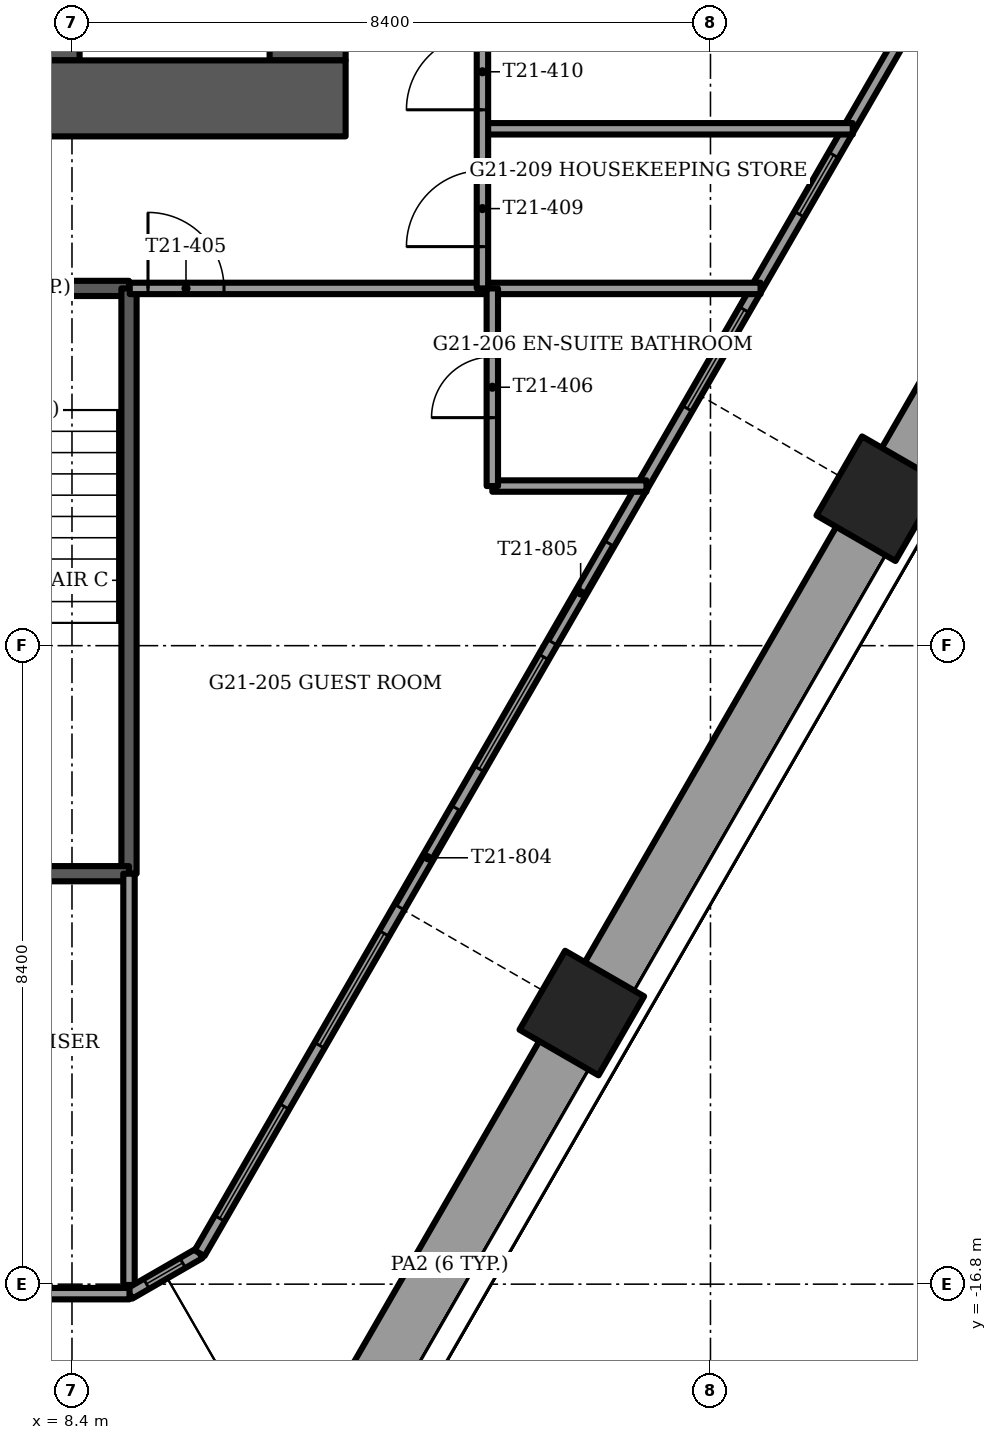
"""IFC4 building model, lengths in metres.
Left out: names, types, materials, properties, quantities, classifications, styles, units other than length and angle.
Written with IfcOpenShell. Run it as: python <this file> out.ifc"""

import sys

from ifc_helpers import new_model, si_unit, direction, frame, frame_2d, origin, origin_2d, place, context, subcontext, project, spatial, rectangle, extrude, element, fill, save


model = new_model("IFC4")
c1 = context("Model", 3, precision=1e-05, world=origin(), true_north=direction((0.0, 1.0)))
c2 = subcontext(c1, "Body", "Model", "MODEL_VIEW")
j1 = project(units=[si_unit("LENGTHUNIT", "METRE"), si_unit("PLANEANGLEUNIT", "RADIAN")], contexts=[c1])
p1 = place(None, origin())
s1 = spatial("IfcSite", under=j1, at=p1, CompositionType="ELEMENT")
p2 = place(p1, origin())
s2 = spatial("IfcBuilding", under=s1, at=p2, CompositionType="ELEMENT")
p3 = place(p2, frame((0.0, 0.0, 85.5)))
s3 = spatial("IfcBuildingStorey", under=s2, at=p3, CompositionType="ELEMENT", Elevation=85.5)
for number, where, z_axis, x_axis in (
    (1, (15.107, -13.233, -1.2), (0.0, 0.0, 1.0), (-0.5, -0.866, 0.0)),
    (2, (19.014, -6.467, -1.2), (0.0, 0.0, 1.0), (-0.5, -0.866, 0.0)),
):
    element("IfcColumn", number, at=place(p3, frame(where, z_axis=z_axis, x_axis=x_axis)), inside=s3, PredefinedType="COLUMN", context=c2, shape_type="SweptSolid", body=[
        extrude(rectangle(XDim=1.2, YDim=1.2, at=origin_2d()), origin(), (0.0, 0.0, 1.0), 3.75),
    ])
p4 = place(p3, frame((-12.0, -1.2, -0.3), z_axis=(0.0, 0.0, 1.0), x_axis=(1.0, 0.0, 0.0)))
e3 = element("IfcWall", 3, at=p4, inside=s3, PredefinedType="SHEAR", context=c2, shape_type="SweptSolid", body=[
    extrude(rectangle(XDim=24.0, YDim=1.0, at=frame_2d((12.0, 0.0))), origin(), (0.0, 0.0, 1.0), 3.75),
])
p5 = place(p4, frame((11.2, 0.0, 0.0)))
e4 = element("IfcOpeningElement", 4, at=p5, cuts=e3, PredefinedType="OPENING", context=c2, shape_type="SweptSolid", body=[
    extrude(rectangle(XDim=1.6, YDim=2.1, at=frame_2d((0.8, 1.05))), frame((0.0, 0.5, 0.0), z_axis=(0.0, -1.0, 0.0), x_axis=(1.0, 0.0, 0.0)), (0.0, 0.0, 1.0), 1.0),
])
p6 = place(p3, frame((8.1, -0.7, -0.3), z_axis=(0.0, 0.0, 1.0), x_axis=(0.0, 1.0, 0.0)))
e5 = element("IfcWall", 5, at=p6, inside=s3, PredefinedType="SHEAR", context=c2, shape_type="SweptSolid", body=[
    extrude(rectangle(XDim=9.4, YDim=0.8, at=frame_2d((4.7, 0.0))), origin(), (0.0, 0.0, 1.0), 3.75),
])
p7 = place(p6, frame((7.95, 0.0, 0.0)))
e6 = element("IfcOpeningElement", 6, at=p7, cuts=e5, PredefinedType="OPENING", context=c2, shape_type="SweptSolid", body=[
    extrude(rectangle(XDim=1.1, YDim=2.1, at=frame_2d((0.55, 1.05))), frame((0.0, 0.4, 0.0), z_axis=(0.0, -1.0, 0.0), x_axis=(1.0, 0.0, 0.0)), (0.0, 0.0, 1.0), 0.8),
])
p8 = place(p3, frame((11.5, -0.7, -0.3), z_axis=(0.0, 0.0, 1.0), x_axis=(0.0, 1.0, 0.0)))
e7 = element("IfcWall", 7, at=p8, inside=s3, PredefinedType="SHEAR", context=c2, shape_type="SweptSolid", body=[
    extrude(rectangle(XDim=9.4, YDim=1.0, at=frame_2d((4.7, 0.0))), origin(), (0.0, 0.0, 1.0), 3.75),
])
p9 = place(p8, frame((8.15, 0.0, 0.0)))
e8 = element("IfcOpeningElement", 8, at=p9, cuts=e7, PredefinedType="OPENING", context=c2, shape_type="SweptSolid", body=[
    extrude(rectangle(XDim=1.1, YDim=2.1, at=frame_2d((0.55, 1.05))), frame((0.0, 0.5, 0.0), z_axis=(0.0, -1.0, 0.0), x_axis=(1.0, 0.0, 0.0)), (0.0, 0.0, 1.0), 1.0),
])
p10 = place(p8, frame((0.55, 0.0, 0.0)))
e9 = element("IfcOpeningElement", 9, at=p10, cuts=e7, PredefinedType="OPENING", context=c2, shape_type="SweptSolid", body=[
    extrude(rectangle(XDim=1.2, YDim=2.1, at=frame_2d((0.6, 1.05))), frame((0.0, 0.5, 0.0), z_axis=(0.0, -1.0, 0.0), x_axis=(1.0, 0.0, 0.0)), (0.0, 0.0, 1.0), 1.0),
])
p11 = place(p8, frame((3.0, 0.0, 0.0)))
e10 = element("IfcOpeningElement", 10, at=p11, cuts=e7, PredefinedType="OPENING", context=c2, shape_type="SweptSolid", body=[
    extrude(rectangle(XDim=1.2, YDim=2.1, at=frame_2d((0.6, 1.05))), frame((0.0, 0.5, 0.0), z_axis=(0.0, -1.0, 0.0), x_axis=(1.0, 0.0, 0.0)), (0.0, 0.0, 1.0), 1.0),
])
p12 = place(p3, frame((11.786, -19.286, 0.0), z_axis=(0.0, 0.0, 1.0), x_axis=(0.499982754166, 0.866035360443, 0.0)))
e11 = element("IfcWall", 11, at=p12, inside=s3, PredefinedType="PARAPET", context=c2, shape_type="SweptSolid", body=[
    extrude(rectangle(XDim=6.333, YDim=0.9, at=frame_2d((3.167, 0.0))), origin(), (0.0, 0.0, 1.0), 1.1),
])
p13 = place(p3, frame((15.522, -12.815, 0.0), z_axis=(0.0, 0.0, 1.0), x_axis=(0.499999023957, 0.866025967302, 0.0)))
e12 = element("IfcWall", 12, at=p13, inside=s3, PredefinedType="PARAPET", context=c2, shape_type="SweptSolid", body=[
    extrude(rectangle(XDim=6.673, YDim=0.9, at=frame_2d((3.337, 0.0))), origin(), (0.0, 0.0, 1.0), 1.1),
])
p14 = place(p3, frame((19.429, -6.048, 0.0), z_axis=(0.0, 0.0, 1.0), x_axis=(0.500011668103, 0.866018667098, 0.0)))
e13 = element("IfcWall", 13, at=p14, inside=s3, PredefinedType="PARAPET", context=c2, shape_type="SweptSolid", body=[
    extrude(rectangle(XDim=6.333, YDim=0.9, at=frame_2d((3.167, 0.0))), origin(), (0.0, 0.0, 1.0), 1.1),
])
p15 = place(p3, frame((-9.157, -16.925, 0.0), z_axis=(0.0, 0.0, 1.0), x_axis=(1.0, 0.0, 0.0)))
e14 = element("IfcWall", 14, at=p15, inside=s3, PredefinedType="SOLIDWALL", context=c2, shape_type="SweptSolid", body=[
    extrude(rectangle(XDim=18.313, YDim=0.15, at=frame_2d((9.157, 0.0))), origin(), (0.0, 0.0, 1.0), 3.45),
])
p16 = place(p15, frame((3.707, 0.0, 0.15)))
e15 = element("IfcOpeningElement", 15, at=p16, cuts=e14, PredefinedType="OPENING", context=c2, shape_type="SweptSolid", body=[
    extrude(rectangle(XDim=0.9, YDim=2.85, at=frame_2d((0.45, 1.425))), frame((0.0, 0.075, 0.0), z_axis=(0.0, -1.0, 0.0), x_axis=(1.0, 0.0, 0.0)), (0.0, 0.0, 1.0), 0.15),
])
p17 = place(p15, frame((1.507, 0.0, 0.15)))
e16 = element("IfcOpeningElement", 16, at=p17, cuts=e14, PredefinedType="OPENING", context=c2, shape_type="SweptSolid", body=[
    extrude(rectangle(XDim=1.5, YDim=2.85, at=frame_2d((0.75, 1.425))), frame((0.0, 0.075, 0.0), z_axis=(0.0, -1.0, 0.0), x_axis=(1.0, 0.0, 0.0)), (0.0, 0.0, 1.0), 0.15),
])
p18 = place(p15, frame((5.257, 0.0, 0.15)))
e17 = element("IfcOpeningElement", 17, at=p18, cuts=e14, PredefinedType="OPENING", context=c2, shape_type="SweptSolid", body=[
    extrude(rectangle(XDim=1.7, YDim=2.85, at=frame_2d((0.85, 1.425))), frame((0.0, 0.075, 0.0), z_axis=(0.0, -1.0, 0.0), x_axis=(1.0, 0.0, 0.0)), (0.0, 0.0, 1.0), 0.15),
])
p19 = place(p15, frame((7.307, 0.0, 0.15)))
e18 = element("IfcOpeningElement", 18, at=p19, cuts=e14, PredefinedType="OPENING", context=c2, shape_type="SweptSolid", body=[
    extrude(rectangle(XDim=1.5, YDim=2.85, at=frame_2d((0.75, 1.425))), frame((0.0, 0.075, 0.0), z_axis=(0.0, -1.0, 0.0), x_axis=(1.0, 0.0, 0.0)), (0.0, 0.0, 1.0), 0.15),
])
p20 = place(p15, frame((9.507, 0.0, 0.15)))
e19 = element("IfcOpeningElement", 19, at=p20, cuts=e14, PredefinedType="OPENING", context=c2, shape_type="SweptSolid", body=[
    extrude(rectangle(XDim=1.7, YDim=2.85, at=frame_2d((0.85, 1.425))), frame((0.0, 0.075, 0.0), z_axis=(0.0, -1.0, 0.0), x_axis=(1.0, 0.0, 0.0)), (0.0, 0.0, 1.0), 0.15),
])
p21 = place(p15, frame((11.557, 0.0, 0.0)))
e20 = element("IfcOpeningElement", 20, at=p21, cuts=e14, PredefinedType="OPENING", context=c2, shape_type="SweptSolid", body=[
    extrude(rectangle(XDim=1.5, YDim=2.4, at=frame_2d((0.75, 1.2))), frame((0.0, 0.075, 0.0), z_axis=(0.0, -1.0, 0.0), x_axis=(1.0, 0.0, 0.0)), (0.0, 0.0, 1.0), 0.15),
])
p22 = place(p15, frame((15.307, 0.0, 0.15)))
e21 = element("IfcOpeningElement", 21, at=p22, cuts=e14, PredefinedType="OPENING", context=c2, shape_type="SweptSolid", body=[
    extrude(rectangle(XDim=1.7, YDim=2.85, at=frame_2d((0.85, 1.425))), frame((0.0, 0.075, 0.0), z_axis=(0.0, -1.0, 0.0), x_axis=(1.0, 0.0, 0.0)), (0.0, 0.0, 1.0), 0.15),
])
p23 = place(p3, frame((10.079, -16.393, 0.0), z_axis=(0.0, 0.0, 1.0), x_axis=(0.499995945303, 0.866027744752, 0.0)))
e22 = element("IfcWall", 22, at=p23, inside=s3, PredefinedType="SOLIDWALL", context=c2, shape_type="SweptSolid", body=[
    extrude(rectangle(XDim=18.314, YDim=0.15, at=frame_2d((9.157, 0.0))), origin(), (0.0, 0.0, 1.0), 3.45),
])
p24 = place(p23, frame((3.157, 0.0, 0.15)))
e23 = element("IfcOpeningElement", 23, at=p24, cuts=e22, PredefinedType="OPENING", context=c2, shape_type="SweptSolid", body=[
    extrude(rectangle(XDim=1.7, YDim=2.85, at=frame_2d((0.85, 1.425))), frame((0.0, 0.075, 0.0), z_axis=(0.0, -1.0, 0.0), x_axis=(1.0, 0.0, 0.0)), (0.0, 0.0, 1.0), 0.15),
])
p25 = place(p23, frame((5.257, 0.0, 0.0)))
e24 = element("IfcOpeningElement", 24, at=p25, cuts=e22, PredefinedType="OPENING", context=c2, shape_type="SweptSolid", body=[
    extrude(rectangle(XDim=1.5, YDim=2.4, at=frame_2d((0.75, 1.2))), frame((0.0, 0.075, 0.0), z_axis=(0.0, -1.0, 0.0), x_axis=(1.0, 0.0, 0.0)), (0.0, 0.0, 1.0), 0.15),
])
p26 = place(p23, frame((7.357, 0.0, 0.15)))
e25 = element("IfcOpeningElement", 25, at=p26, cuts=e22, PredefinedType="OPENING", context=c2, shape_type="SweptSolid", body=[
    extrude(rectangle(XDim=1.7, YDim=2.85, at=frame_2d((0.85, 1.425))), frame((0.0, 0.075, 0.0), z_axis=(0.0, -1.0, 0.0), x_axis=(1.0, 0.0, 0.0)), (0.0, 0.0, 1.0), 0.15),
])
p27 = place(p23, frame((9.28, 0.0, 0.0)))
e26 = element("IfcOpeningElement", 26, at=p27, cuts=e22, PredefinedType="OPENING", context=c2, shape_type="SweptSolid", body=[
    extrude(rectangle(XDim=1.5, YDim=2.4, at=frame_2d((0.75, 1.2))), frame((0.0, 0.075, 0.0), z_axis=(0.0, -1.0, 0.0), x_axis=(1.0, 0.0, 0.0)), (0.0, 0.0, 1.0), 0.15),
])
p28 = place(p23, frame((12.832, 0.0, 0.15)))
e27 = element("IfcOpeningElement", 27, at=p28, cuts=e22, PredefinedType="OPENING", context=c2, shape_type="SweptSolid", body=[
    extrude(rectangle(XDim=1.5, YDim=2.85, at=frame_2d((0.75, 1.425))), frame((0.0, 0.075, 0.0), z_axis=(0.0, -1.0, 0.0), x_axis=(1.0, 0.0, 0.0)), (0.0, 0.0, 1.0), 0.15),
])
p29 = place(p23, frame((0.528, 0.0, 0.15)))
e28 = element("IfcOpeningElement", 28, at=p29, cuts=e22, PredefinedType="OPENING", context=c2, shape_type="SweptSolid", body=[
    extrude(rectangle(XDim=1.7, YDim=2.73, at=frame_2d((0.85, 1.365))), frame((0.0, 0.075, 0.0), z_axis=(0.0, -1.0, 0.0), x_axis=(1.0, 0.0, 0.0)), (0.0, 0.0, 1.0), 0.15),
])
p30 = place(p23, frame((15.782, 0.0, 0.15)))
e29 = element("IfcOpeningElement", 29, at=p30, cuts=e22, PredefinedType="OPENING", context=c2, shape_type="SweptSolid", body=[
    extrude(rectangle(XDim=0.9, YDim=2.73, at=frame_2d((0.45, 1.365))), frame((0.0, 0.075, 0.0), z_axis=(0.0, -1.0, 0.0), x_axis=(1.0, 0.0, 0.0)), (0.0, 0.0, 1.0), 0.15),
])
p31 = place(p3, frame((9.157, -16.925, 0.0), z_axis=(0.0, 0.0, 1.0), x_axis=(0.866048165231, 0.499960573946, 0.0)))
e30 = element("IfcWall", 30, at=p31, inside=s3, PredefinedType="SOLIDWALL", context=c2, shape_type="SweptSolid", body=[
    extrude(rectangle(XDim=1.065, YDim=0.15, at=frame_2d((0.532, 0.0))), origin(), (0.0, 0.0, 1.0), 3.45),
])
p32 = place(p31, frame((0.258, 0.0, 0.15)))
e31 = element("IfcOpeningElement", 31, at=p32, cuts=e30, PredefinedType="OPENING", context=c2, shape_type="SweptSolid", body=[
    extrude(rectangle(XDim=0.55, YDim=2.85, at=frame_2d((0.275, 1.425))), frame((0.0, 0.075, 0.0), z_axis=(0.0, -1.0, 0.0), x_axis=(1.0, 0.0, 0.0)), (0.0, 0.0, 1.0), 0.15),
])
p33 = place(p3, frame((5.8, -3.7, -0.3), z_axis=(0.0, 0.0, 1.0), x_axis=(1.0, 0.0, 0.0)))
e32 = element("IfcWall", 32, at=p33, inside=s3, PredefinedType="SOLIDWALL", context=c2, shape_type="SweptSolid", body=[
    extrude(rectangle(XDim=3.35, YDim=0.2, at=frame_2d((1.675, 0.0))), origin(), (0.0, 0.0, 1.0), 3.75),
])
p34 = place(p33, frame((1.125, 0.0, 0.0)))
e33 = element("IfcOpeningElement", 33, at=p34, cuts=e32, PredefinedType="OPENING", context=c2, shape_type="SweptSolid", body=[
    extrude(rectangle(XDim=1.1, YDim=2.1, at=frame_2d((0.55, 1.05))), frame((0.0, 0.1, 0.0), z_axis=(0.0, -1.0, 0.0), x_axis=(1.0, 0.0, 0.0)), (0.0, 0.0, 1.0), 0.2),
])
p35 = place(p3, frame((9.15, -3.7, -0.3), z_axis=(0.0, 0.0, 1.0), x_axis=(0.0, -1.0, 0.0)))
e34 = element("IfcWall", 34, at=p35, inside=s3, PredefinedType="SOLIDWALL", context=c2, shape_type="SweptSolid", body=[
    extrude(rectangle(XDim=7.7, YDim=0.2, at=frame_2d((3.85, 0.0))), origin(), (0.0, 0.0, 1.0), 3.75),
])
p36 = place(p3, frame((5.8, -11.4, -0.3), z_axis=(0.0, 0.0, 1.0), x_axis=(1.0, 0.0, 0.0)))
e35 = element("IfcWall", 35, at=p36, inside=s3, PredefinedType="SOLIDWALL", context=c2, shape_type="SweptSolid", body=[
    extrude(rectangle(XDim=3.35, YDim=0.2, at=frame_2d((1.675, 0.0))), origin(), (0.0, 0.0, 1.0), 3.75),
])
p37 = place(p3, frame((9.15, -11.4, 0.0), z_axis=(0.0, 0.0, 1.0), x_axis=(0.0, -1.0, 0.0)))
e36 = element("IfcWall", 36, at=p37, inside=s3, PredefinedType="PARTITIONING", context=c2, shape_type="SweptSolid", body=[
    extrude(rectangle(XDim=5.411, YDim=0.15, at=frame_2d((2.706, 0.0))), origin(), (0.0, 0.0, 1.0), 3.45),
])
p38 = place(p3, frame((13.93, -6.3, 0.0), z_axis=(0.0, 0.0, 1.0), x_axis=(1.0, 0.0, 0.0)))
e37 = element("IfcWall", 37, at=p38, inside=s3, PredefinedType="PARTITIONING", context=c2, shape_type="SweptSolid", body=[
    extrude(rectangle(XDim=2.028, YDim=0.15, at=frame_2d((1.014, 0.0))), origin(), (0.0, 0.0, 1.0), 3.45),
])
p39 = place(p3, frame((9.16, -3.7, 0.0), z_axis=(0.0, 0.0, 1.0), x_axis=(1.0, 0.0, 0.0)))
e38 = element("IfcWall", 38, at=p39, inside=s3, PredefinedType="PARTITIONING", context=c2, shape_type="SweptSolid", body=[
    extrude(rectangle(XDim=8.299, YDim=0.15, at=frame_2d((4.149, 0.0))), origin(), (0.0, 0.0, 1.0), 3.45),
])
p40 = place(p39, frame((0.24, 0.0, 0.0)))
e39 = element("IfcOpeningElement", 39, at=p40, cuts=e38, PredefinedType="OPENING", context=c2, shape_type="SweptSolid", body=[
    extrude(rectangle(XDim=1.0, YDim=2.1, at=frame_2d((0.5, 1.05))), frame((0.0, 0.075, 0.0), z_axis=(0.0, -1.0, 0.0), x_axis=(1.0, 0.0, 0.0)), (0.0, 0.0, 1.0), 0.15),
])
p41 = place(p3, frame((13.8, -1.6, 0.0), z_axis=(0.0, 0.0, 1.0), x_axis=(1.0, 0.0, 0.0)))
e40 = element("IfcWall", 40, at=p41, inside=s3, PredefinedType="PARTITIONING", context=c2, shape_type="SweptSolid", body=[
    extrude(rectangle(XDim=4.872, YDim=0.15, at=frame_2d((2.436, 0.0))), origin(), (0.0, 0.0, 1.0), 3.45),
])
p42 = place(p3, frame((13.93, -6.3, 0.0), z_axis=(0.0, 0.0, 1.0), x_axis=(0.0, 1.0, 0.0)))
e41 = element("IfcWall", 41, at=p42, inside=s3, PredefinedType="PARTITIONING", context=c2, shape_type="SweptSolid", body=[
    extrude(rectangle(XDim=2.6, YDim=0.15, at=frame_2d((1.3, 0.0))), origin(), (0.0, 0.0, 1.0), 3.45),
])
p43 = place(p42, frame((0.9, 0.0, 0.0)))
e42 = element("IfcOpeningElement", 42, at=p43, cuts=e41, PredefinedType="OPENING", context=c2, shape_type="SweptSolid", body=[
    extrude(rectangle(XDim=0.8, YDim=2.1, at=frame_2d((0.4, 1.05))), frame((0.0, 0.075, 0.0), z_axis=(0.0, -1.0, 0.0), x_axis=(1.0, 0.0, 0.0)), (0.0, 0.0, 1.0), 0.15),
])
p44 = place(p3, frame((13.8, -3.7, 0.0), z_axis=(0.0, 0.0, 1.0), x_axis=(0.0, 1.0, 0.0)))
e43 = element("IfcWall", 43, at=p44, inside=s3, PredefinedType="PARTITIONING", context=c2, shape_type="SweptSolid", body=[
    extrude(rectangle(XDim=13.738, YDim=0.15, at=frame_2d((6.869, 0.0))), origin(), (0.0, 0.0, 1.0), 3.45),
])
p45 = place(p44, frame((0.55, 0.0, 0.0)))
e44 = element("IfcOpeningElement", 44, at=p45, cuts=e43, PredefinedType="OPENING", context=c2, shape_type="SweptSolid", body=[
    extrude(rectangle(XDim=1.0, YDim=2.1, at=frame_2d((0.5, 1.05))), frame((0.0, 0.075, 0.0), z_axis=(0.0, -1.0, 0.0), x_axis=(1.0, 0.0, 0.0)), (0.0, 0.0, 1.0), 0.15),
])
p46 = place(p44, frame((2.35, 0.0, 0.0)))
e45 = element("IfcOpeningElement", 45, at=p46, cuts=e43, PredefinedType="OPENING", context=c2, shape_type="SweptSolid", body=[
    extrude(rectangle(XDim=1.0, YDim=2.1, at=frame_2d((0.5, 1.05))), frame((0.0, 0.075, 0.0), z_axis=(0.0, -1.0, 0.0), x_axis=(1.0, 0.0, 0.0)), (0.0, 0.0, 1.0), 0.15),
])
p47 = place(p44, frame((9.4, 0.0, 0.0)))
e46 = element("IfcOpeningElement", 46, at=p47, cuts=e43, PredefinedType="OPENING", context=c2, shape_type="SweptSolid", body=[
    extrude(rectangle(XDim=1.0, YDim=2.1, at=frame_2d((0.5, 1.05))), frame((0.0, 0.075, 0.0), z_axis=(0.0, -1.0, 0.0), x_axis=(1.0, 0.0, 0.0)), (0.0, 0.0, 1.0), 0.15),
])
p48 = place(p24, origin())
e47 = element("IfcWindow", 47, at=p48, inside=s3, PartitioningType="SINGLE_PANEL", PredefinedType="WINDOW", context=c2, shape_type="SweptSolid", body=[
    extrude(rectangle(XDim=1.7, YDim=2.85, at=frame_2d((0.85, 1.425))), frame((0.0, 0.03, 0.0), z_axis=(0.0, -1.0, 0.0), x_axis=(1.0, 0.0, 0.0)), (0.0, 0.0, 1.0), 0.06),
])
fill(e23, e47)
p49 = place(p25, origin())
e48 = element("IfcDoor", 48, at=p49, inside=s3, OperationType="SLIDING_TO_LEFT", PredefinedType="DOOR", context=c2, shape_type="SweptSolid", body=[
    extrude(rectangle(XDim=1.5, YDim=2.4, at=frame_2d((0.75, 1.2))), frame((0.0, 0.025, 0.0), z_axis=(0.0, -1.0, 0.0), x_axis=(1.0, 0.0, 0.0)), (0.0, 0.0, 1.0), 0.05),
])
fill(e24, e48)
p50 = place(p26, origin())
e49 = element("IfcWindow", 49, at=p50, inside=s3, PartitioningType="SINGLE_PANEL", PredefinedType="WINDOW", context=c2, shape_type="SweptSolid", body=[
    extrude(rectangle(XDim=1.7, YDim=2.85, at=frame_2d((0.85, 1.425))), frame((0.0, 0.03, 0.0), z_axis=(0.0, -1.0, 0.0), x_axis=(1.0, 0.0, 0.0)), (0.0, 0.0, 1.0), 0.06),
])
fill(e25, e49)
p51 = place(p27, origin())
e50 = element("IfcDoor", 50, at=p51, inside=s3, OperationType="SLIDING_TO_RIGHT", PredefinedType="DOOR", context=c2, shape_type="SweptSolid", body=[
    extrude(rectangle(XDim=1.5, YDim=2.4, at=frame_2d((0.75, 1.2))), frame((0.0, 0.025, 0.0), z_axis=(0.0, -1.0, 0.0), x_axis=(1.0, 0.0, 0.0)), (0.0, 0.0, 1.0), 0.05),
])
fill(e26, e50)
p52 = place(p28, origin())
e51 = element("IfcWindow", 51, at=p52, inside=s3, PartitioningType="SINGLE_PANEL", PredefinedType="WINDOW", context=c2, shape_type="SweptSolid", body=[
    extrude(rectangle(XDim=1.5, YDim=2.85, at=frame_2d((0.75, 1.425))), frame((0.0, 0.03, 0.0), z_axis=(0.0, -1.0, 0.0), x_axis=(1.0, 0.0, 0.0)), (0.0, 0.0, 1.0), 0.06),
])
fill(e27, e51)
p53 = place(p29, origin())
e52 = element("IfcWindow", 52, at=p53, inside=s3, PartitioningType="SINGLE_PANEL", PredefinedType="WINDOW", context=c2, shape_type="SweptSolid", body=[
    extrude(rectangle(XDim=1.7, YDim=2.73, at=frame_2d((0.85, 1.365))), frame((0.0, 0.03, 0.0), z_axis=(0.0, -1.0, 0.0), x_axis=(1.0, 0.0, 0.0)), (0.0, 0.0, 1.0), 0.06),
])
fill(e28, e52)
p54 = place(p30, origin())
e53 = element("IfcWindow", 53, at=p54, inside=s3, PartitioningType="SINGLE_PANEL", PredefinedType="WINDOW", context=c2, shape_type="SweptSolid", body=[
    extrude(rectangle(XDim=0.9, YDim=2.73, at=frame_2d((0.45, 1.365))), frame((0.0, 0.03, 0.0), z_axis=(0.0, -1.0, 0.0), x_axis=(1.0, 0.0, 0.0)), (0.0, 0.0, 1.0), 0.06),
])
fill(e29, e53)
p55 = place(p32, origin())
e54 = element("IfcWindow", 54, at=p55, inside=s3, PartitioningType="SINGLE_PANEL", PredefinedType="WINDOW", context=c2, shape_type="SweptSolid", body=[
    extrude(rectangle(XDim=0.55, YDim=2.85, at=frame_2d((0.275, 1.425))), frame((0.0, 0.03, 0.0), z_axis=(0.0, -1.0, 0.0), x_axis=(1.0, 0.0, 0.0)), (0.0, 0.0, 1.0), 0.06),
])
fill(e31, e54)
p56 = place(p40, origin())
e55 = element("IfcDoor", 55, at=p56, inside=s3, OperationType="SINGLE_SWING_LEFT", PredefinedType="DOOR", context=c2, shape_type="SweptSolid", body=[
    extrude(rectangle(XDim=1.0, YDim=2.1, at=frame_2d((0.5, 1.05))), frame((0.0, 0.025, 0.0), z_axis=(0.0, -1.0, 0.0), x_axis=(1.0, 0.0, 0.0)), (0.0, 0.0, 1.0), 0.05),
])
fill(e39, e55)
p57 = place(p43, origin())
e56 = element("IfcDoor", 56, at=p57, inside=s3, OperationType="SINGLE_SWING_RIGHT", PredefinedType="DOOR", context=c2, shape_type="SweptSolid", body=[
    extrude(rectangle(XDim=0.8, YDim=2.1, at=frame_2d((0.4, 1.05))), frame((0.0, 0.025, 0.0), z_axis=(0.0, -1.0, 0.0), x_axis=(1.0, 0.0, 0.0)), (0.0, 0.0, 1.0), 0.05),
])
fill(e42, e56)
p58 = place(p45, origin())
e57 = element("IfcDoor", 57, at=p58, inside=s3, OperationType="SINGLE_SWING_LEFT", PredefinedType="DOOR", context=c2, shape_type="SweptSolid", body=[
    extrude(rectangle(XDim=1.0, YDim=2.1, at=frame_2d((0.5, 1.05))), frame((0.0, 0.025, 0.0), z_axis=(0.0, -1.0, 0.0), x_axis=(1.0, 0.0, 0.0)), (0.0, 0.0, 1.0), 0.05),
])
fill(e44, e57)
p59 = place(p46, origin())
e58 = element("IfcDoor", 58, at=p59, inside=s3, OperationType="SINGLE_SWING_LEFT", PredefinedType="DOOR", context=c2, shape_type="SweptSolid", body=[
    extrude(rectangle(XDim=1.0, YDim=2.1, at=frame_2d((0.5, 1.05))), frame((0.0, 0.025, 0.0), z_axis=(0.0, -1.0, 0.0), x_axis=(1.0, 0.0, 0.0)), (0.0, 0.0, 1.0), 0.05),
])
fill(e45, e58)
save(model, sys.argv[1])
